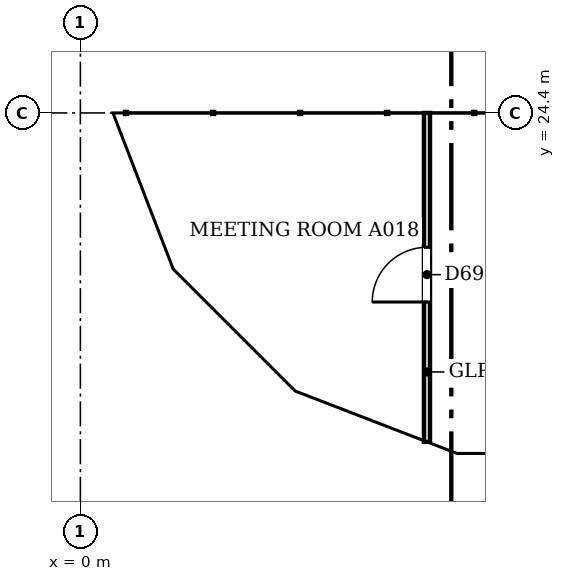
"""IFC4 building model, lengths in metres.
Left out: names, types, materials, properties, quantities, classifications, styles, units other than length and angle.
Written with IfcOpenShell. Run it as: python <this file> out.ifc"""

import sys

from ifc_helpers import new_model, si_unit, direction, frame, frame_2d, origin, place, context, subcontext, project, spatial, polyline, rectangle, outline, extrude, faceted_brep, source, transform, mapped, element, fill, save


model = new_model("IFC4")
c1 = context("Model", 3, precision=1e-05, world=origin(), true_north=direction((0.0, 1.0)))
c2 = subcontext(c1, "Body", "Model", "MODEL_VIEW")
j1 = project(units=[si_unit("LENGTHUNIT", "METRE"), si_unit("PLANEANGLEUNIT", "RADIAN")], contexts=[c1])
p1 = place(None, origin())
s1 = spatial("IfcSite", under=j1, at=p1, CompositionType="ELEMENT")
p2 = place(p1, origin())
s2 = spatial("IfcBuilding", under=s1, at=p2, CompositionType="ELEMENT")
p3 = place(p2, frame((0.0, 0.0, 220.7)))
s3 = spatial("IfcBuildingStorey", under=s2, at=p3, CompositionType="ELEMENT", Elevation=220.7)
m1 = source(origin(), c2, "Body", "Brep", [
    faceted_brep([(3.05, -0.25, 0.0), (6.053, -0.25, 3.8), (3.05, -0.25, 7.6), (0.0, -0.25, 3.8), (0.0, 0.25, 3.8), (3.05, 0.25, 7.6), (6.007, 0.25, 3.859), (6.007, 0.25, 3.741), (3.05, 0.25, 0.0), (6.053, 0.0, 3.8)], [[[0, 1, 2, 3]], [[4, 5, 6, 7, 8]], [[8, 7, 9, 1, 0]], [[6, 5, 2, 1, 9]], [[5, 4, 3, 2]], [[4, 8, 0, 3]], [[9, 7, 6]]]),
])
p4 = place(p3, frame((0.25, 30.5, -3.8), z_axis=(0.0, 0.0, 1.0), x_axis=(0.0, -1.0, 0.0)))
e1 = element("IfcWall", 1, at=p4, inside=s3, PredefinedType="SOLIDWALL", context=c2, shape_type="MappedRepresentation", body=[
    mapped(m1, transform((0.0, 0.0, 0.0), scale=1.0)),
])
m2 = source(origin(), c2, "Body", "SweptSolid", [
    extrude(outline(polyline([(3.049, 0.401), (5.735, 3.8), (3.049, 7.199), (0.321, 3.8), (3.049, 0.401)])), frame((0.0, 0.26, 0.0), z_axis=(0.0, -1.0, 0.0), x_axis=(1.0, 0.0, 0.0)), (0.0, 0.0, 1.0), 0.52),
])
p5 = place(p4, origin())
e2 = element("IfcOpeningElement", 2, at=p5, cuts=e1, PredefinedType="OPENING", context=c2, shape_type="MappedRepresentation", body=[
    mapped(m2, transform((0.0, 0.0, 0.0), scale=1.0)),
])
m3 = source(origin(), c2, "Body", "Brep", [
    faceted_brep([(2.95, -0.25, 0.0), (3.003, -0.25, 0.068), (3.003, -0.25, 7.532), (2.95, -0.25, 7.6), (0.0, -0.25, 3.8), (0.047, 0.25, 3.86), (2.898, 0.25, 7.532), (2.898, 0.25, 0.068), (0.047, 0.25, 3.74), (2.95, 0.0, 0.0), (2.95, 0.0, 7.6), (0.0, 0.0, 3.8)], [[[0, 1, 2, 3, 4]], [[5, 6, 7, 8]], [[1, 0, 9]], [[10, 3, 2]], [[6, 5, 11, 4, 3, 10]], [[8, 7, 9, 0, 4, 11]], [[8, 11, 5]], [[1, 9, 7, 6, 10, 2]]]),
])
p6 = place(p3, frame((0.25, 24.447, -3.8), z_axis=(0.0, 0.0, 1.0), x_axis=(0.35992665181, -0.932980602862, 0.0)))
e3 = element("IfcWall", 3, at=p6, inside=s3, PredefinedType="SOLIDWALL", context=c2, shape_type="MappedRepresentation", body=[
    mapped(m3, transform((0.0, 0.0, 0.0), scale=1.0)),
])
m4 = source(origin(), c2, "Body", "SweptSolid", [
    extrude(outline(polyline([(2.75, 6.935), (0.316, 3.8), (2.75, 0.665), (2.75, 6.935)])), frame((0.0, 0.26, 0.0), z_axis=(0.0, -1.0, 0.0), x_axis=(1.0, 0.0, 0.0)), (0.0, 0.0, 1.0), 0.52),
])
p7 = place(p6, origin())
e4 = element("IfcOpeningElement", 4, at=p7, cuts=e3, PredefinedType="OPENING", context=c2, shape_type="MappedRepresentation", body=[
    mapped(m4, transform((0.0, 0.0, 0.0), scale=1.0)),
])
m5 = source(origin(), c2, "Body", "Brep", [
    faceted_brep([(0.053, -0.25, 0.0), (2.997, -0.25, 3.8), (0.053, -0.25, 7.6), (0.0, -0.25, 7.532), (0.0, -0.25, 0.068), (0.106, 0.25, 7.532), (2.944, 0.25, 3.868), (2.944, 0.25, 3.732), (0.106, 0.25, 0.068), (2.997, 0.0, 3.8), (0.053, 0.0, 0.0), (0.053, 0.0, 7.6)], [[[0, 1, 2, 3, 4]], [[5, 6, 7, 8]], [[8, 7, 9, 1, 0, 10]], [[6, 5, 11, 2, 1, 9]], [[3, 2, 11]], [[10, 0, 4]], [[8, 10, 4, 3, 11, 5]], [[9, 7, 6]]]),
])
p8 = place(p3, frame((1.274, 21.731, -3.8), z_axis=(0.0, 0.0, 1.0), x_axis=(0.707147509625, -0.707066050402, 0.0)))
e5 = element("IfcWall", 5, at=p8, inside=s3, PredefinedType="SOLIDWALL", context=c2, shape_type="MappedRepresentation", body=[
    mapped(m5, transform((0.0, 0.0, 0.0), scale=1.0)),
])
m6 = source(origin(), c2, "Body", "SweptSolid", [
    extrude(outline(polyline([(0.253, 0.667), (2.681, 3.8), (0.253, 6.934), (0.253, 0.667)])), frame((0.0, 0.26, 0.0), z_axis=(0.0, -1.0, 0.0), x_axis=(1.0, 0.0, 0.0)), (0.0, 0.0, 1.0), 0.52),
])
p9 = place(p8, origin())
e6 = element("IfcOpeningElement", 6, at=p9, cuts=e5, PredefinedType="OPENING", context=c2, shape_type="MappedRepresentation", body=[
    mapped(m6, transform((0.0, 0.0, 0.0), scale=1.0)),
])
m7 = source(origin(), c2, "Body", "Brep", [
    faceted_brep([(2.95, -0.25, 0.0), (2.997, -0.25, 0.059), (2.997, -0.25, 7.541), (2.95, -0.25, 7.6), (0.0, -0.25, 3.8), (0.053, 0.25, 3.868), (2.904, 0.25, 7.54), (2.904, 0.25, 0.06), (0.053, 0.25, 3.732), (2.95, 0.0, 0.0), (2.95, 0.0, 7.6), (0.0, 0.0, 3.8)], [[[0, 1, 2, 3, 4]], [[5, 6, 7, 8]], [[1, 0, 9]], [[10, 3, 2]], [[6, 5, 11, 4, 3, 10]], [[8, 7, 9, 0, 4, 11]], [[8, 11, 5]], [[1, 9, 7, 6, 10, 2]]]),
])
p10 = place(p3, frame((3.394, 19.612, -3.8), z_axis=(0.0, 0.0, 1.0), x_axis=(0.932990326376, -0.359901446078, 0.0)))
e7 = element("IfcWall", 7, at=p10, inside=s3, PredefinedType="SOLIDWALL", context=c2, shape_type="MappedRepresentation", body=[
    mapped(m7, transform((0.0, 0.0, 0.0), scale=1.0)),
])
p11 = place(p10, origin())
e8 = element("IfcOpeningElement", 8, at=p11, cuts=e7, PredefinedType="OPENING", context=c2, shape_type="MappedRepresentation", body=[
    mapped(m4, transform((0.0, 0.0, 0.0), scale=1.0)),
])
m8 = source(origin(), c2, "Body", "Brep", [
    faceted_brep([(0.047, -0.25, 0.0), (3.05, -0.25, 3.8), (0.047, -0.25, 7.6), (0.0, -0.25, 7.54), (0.0, -0.25, 0.06), (0.093, 0.25, 7.541), (3.05, 0.25, 3.8), (0.093, 0.25, 0.059), (0.047, 0.0, 0.0), (0.047, 0.0, 7.6)], [[[0, 1, 2, 3, 4]], [[5, 6, 7]], [[7, 6, 1, 0, 8]], [[6, 5, 9, 2, 1]], [[3, 2, 9]], [[8, 0, 4]], [[7, 8, 4, 3, 9, 5]]]),
])
p12 = place(p3, frame((6.1, 18.55, -3.8), z_axis=(0.0, 0.0, 1.0), x_axis=(1.0, 0.0, 0.0)))
e9 = element("IfcWall", 9, at=p12, inside=s3, PredefinedType="SOLIDWALL", context=c2, shape_type="MappedRepresentation", body=[
    mapped(m8, transform((0.0, 0.0, 0.0), scale=1.0)),
])
m9 = source(origin(), c2, "Body", "SweptSolid", [
    extrude(outline(polyline([(0.247, 0.656), (2.731, 3.8), (0.247, 6.944), (0.247, 0.656)])), frame((0.0, 0.26, 0.0), z_axis=(0.0, -1.0, 0.0), x_axis=(1.0, 0.0, 0.0)), (0.0, 0.0, 1.0), 0.52),
])
p13 = place(p12, origin())
e10 = element("IfcOpeningElement", 10, at=p13, cuts=e9, PredefinedType="OPENING", context=c2, shape_type="MappedRepresentation", body=[
    mapped(m9, transform((0.0, 0.0, 0.0), scale=1.0)),
])
p14 = place(p2, frame((0.0, 0.0, 224.5)))
s4 = spatial("IfcBuildingStorey", under=s2, at=p14, CompositionType="ELEMENT", Elevation=224.5)
m10 = source(origin(), c2, "Body", "Brep", [
    faceted_brep([(3.003, -0.25, 0.0), (3.05, -0.25, 0.06), (3.05, -0.25, 7.54), (3.003, -0.25, 7.6), (0.0, -0.25, 3.8), (0.0, 0.25, 3.8), (2.957, 0.25, 7.541), (2.957, 0.25, 0.059), (3.003, 0.0, 0.0), (3.003, 0.0, 7.6)], [[[0, 1, 2, 3, 4]], [[5, 6, 7]], [[1, 0, 8]], [[9, 3, 2]], [[6, 5, 4, 3, 9]], [[5, 7, 8, 0, 4]], [[1, 8, 7, 6, 9, 2]]]),
])
p15 = place(p14, frame((0.25, 27.45, -3.8), z_axis=(0.0, 0.0, 1.0), x_axis=(0.0, -1.0, 0.0)))
e11 = element("IfcWall", 11, at=p15, inside=s4, PredefinedType="SOLIDWALL", context=c2, shape_type="MappedRepresentation", body=[
    mapped(m10, transform((0.0, 0.0, 0.0), scale=1.0)),
])
m11 = source(origin(), c2, "Body", "SweptSolid", [
    extrude(outline(polyline([(2.803, 6.944), (0.319, 3.8), (2.803, 0.656), (2.803, 6.944)])), frame((0.0, 0.26, 0.0), z_axis=(0.0, -1.0, 0.0), x_axis=(1.0, 0.0, 0.0)), (0.0, 0.0, 1.0), 0.52),
])
p16 = place(p15, origin())
e12 = element("IfcOpeningElement", 12, at=p16, cuts=e11, PredefinedType="OPENING", context=c2, shape_type="MappedRepresentation", body=[
    mapped(m11, transform((0.0, 0.0, 0.0), scale=1.0)),
])
m12 = source(origin(), c2, "Body", "Brep", [
    faceted_brep([(0.047, -0.25, 0.0), (2.997, -0.25, 3.8), (0.047, -0.25, 7.6), (0.0, -0.25, 7.541), (0.0, -0.25, 0.059), (0.093, 0.25, 7.54), (2.944, 0.25, 3.868), (2.944, 0.25, 3.732), (0.093, 0.25, 0.06), (2.997, 0.0, 3.8), (0.047, 0.0, 0.0), (0.047, 0.0, 7.6)], [[[0, 1, 2, 3, 4]], [[5, 6, 7, 8]], [[8, 7, 9, 1, 0, 10]], [[6, 5, 11, 2, 1, 9]], [[3, 2, 11]], [[10, 0, 4]], [[8, 10, 4, 3, 11, 5]], [[9, 7, 6]]]),
])
p17 = place(p14, frame((0.233, 24.49, -3.8), z_axis=(0.0, 0.0, 1.0), x_axis=(0.359901446078, -0.932990326376, 0.0)))
e13 = element("IfcWall", 13, at=p17, inside=s4, PredefinedType="SOLIDWALL", context=c2, shape_type="MappedRepresentation", body=[
    mapped(m12, transform((0.0, 0.0, 0.0), scale=1.0)),
])
m13 = source(origin(), c2, "Body", "SweptSolid", [
    extrude(outline(polyline([(0.247, 0.665), (2.681, 3.8), (0.247, 6.935), (0.247, 0.665)])), frame((0.0, 0.26, 0.0), z_axis=(0.0, -1.0, 0.0), x_axis=(1.0, 0.0, 0.0)), (0.0, 0.0, 1.0), 0.52),
])
p18 = place(p17, origin())
e14 = element("IfcOpeningElement", 14, at=p18, cuts=e13, PredefinedType="OPENING", context=c2, shape_type="MappedRepresentation", body=[
    mapped(m13, transform((0.0, 0.0, 0.0), scale=1.0)),
])
m14 = source(origin(), c2, "Body", "Brep", [
    faceted_brep([(2.944, -0.25, 0.0), (2.997, -0.25, 0.068), (2.997, -0.25, 7.532), (2.944, -0.25, 7.6), (0.0, -0.25, 3.8), (0.053, 0.25, 3.868), (2.891, 0.25, 7.532), (2.891, 0.25, 0.068), (0.053, 0.25, 3.732), (2.944, 0.0, 0.0), (2.944, 0.0, 7.6), (0.0, 0.0, 3.8)], [[[0, 1, 2, 3, 4]], [[5, 6, 7, 8]], [[1, 0, 9]], [[10, 3, 2]], [[6, 5, 11, 4, 3, 10]], [[8, 7, 9, 0, 4, 11]], [[8, 11, 5]], [[1, 9, 7, 6, 10, 2]]]),
])
p19 = place(p14, frame((1.312, 21.694, -3.8), z_axis=(0.0, 0.0, 1.0), x_axis=(0.707066050402, -0.707147509625, 0.0)))
e15 = element("IfcWall", 15, at=p19, inside=s4, PredefinedType="SOLIDWALL", context=c2, shape_type="MappedRepresentation", body=[
    mapped(m14, transform((0.0, 0.0, 0.0), scale=1.0)),
])
m15 = source(origin(), c2, "Body", "SweptSolid", [
    extrude(outline(polyline([(2.744, 6.934), (0.316, 3.8), (2.744, 0.666), (2.744, 6.934)])), frame((0.0, 0.26, 0.0), z_axis=(0.0, -1.0, 0.0), x_axis=(1.0, 0.0, 0.0)), (0.0, 0.0, 1.0), 0.52),
])
p20 = place(p19, origin())
e16 = element("IfcOpeningElement", 16, at=p20, cuts=e15, PredefinedType="OPENING", context=c2, shape_type="MappedRepresentation", body=[
    mapped(m15, transform((0.0, 0.0, 0.0), scale=1.0)),
])
m16 = source(origin(), c2, "Body", "Brep", [
    faceted_brep([(0.053, -0.25, 0.0), (3.003, -0.25, 3.8), (0.053, -0.25, 7.6), (0.0, -0.25, 7.532), (0.0, -0.25, 0.068), (0.106, 0.25, 7.532), (2.957, 0.25, 3.86), (2.957, 0.25, 3.74), (0.106, 0.25, 0.068), (3.003, 0.0, 3.8), (0.053, 0.0, 0.0), (0.053, 0.0, 7.6)], [[[0, 1, 2, 3, 4]], [[5, 6, 7, 8]], [[8, 7, 9, 1, 0, 10]], [[6, 5, 11, 2, 1, 9]], [[3, 2, 11]], [[10, 0, 4]], [[8, 10, 4, 3, 11, 5]], [[9, 7, 6]]]),
])
p21 = place(p14, frame((3.344, 19.631, -3.8), z_axis=(0.0, 0.0, 1.0), x_axis=(0.933007896601, -0.359855894603, 0.0)))
e17 = element("IfcWall", 17, at=p21, inside=s4, PredefinedType="SOLIDWALL", context=c2, shape_type="MappedRepresentation", body=[
    mapped(m16, transform((0.0, 0.0, 0.0), scale=1.0)),
])
m17 = source(origin(), c2, "Body", "SweptSolid", [
    extrude(outline(polyline([(0.253, 0.665), (2.687, 3.8), (0.253, 6.935), (0.253, 0.665)])), frame((0.0, 0.26, 0.0), z_axis=(0.0, -1.0, 0.0), x_axis=(1.0, 0.0, 0.0)), (0.0, 0.0, 1.0), 0.52),
])
p22 = place(p21, origin())
e18 = element("IfcOpeningElement", 18, at=p22, cuts=e17, PredefinedType="OPENING", context=c2, shape_type="MappedRepresentation", body=[
    mapped(m17, transform((0.0, 0.0, 0.0), scale=1.0)),
])
m18 = source(origin(), c2, "Body", "Brep", [
    faceted_brep([(3.003, -0.25, 0.0), (6.053, -0.25, 3.8), (3.003, -0.25, 7.6), (0.0, -0.25, 3.8), (0.047, 0.25, 3.859), (3.003, 0.25, 7.6), (6.053, 0.25, 3.8), (3.003, 0.25, 0.0), (0.047, 0.25, 3.741), (0.0, 0.0, 3.8)], [[[0, 1, 2, 3]], [[4, 5, 6, 7, 8]], [[7, 6, 1, 0]], [[6, 5, 2, 1]], [[5, 4, 9, 3, 2]], [[8, 7, 0, 3, 9]], [[8, 9, 4]]]),
])
p23 = place(p14, frame((6.146, 18.55, -3.8), z_axis=(0.0, 0.0, 1.0), x_axis=(1.0, 0.0, 0.0)))
e19 = element("IfcWall", 19, at=p23, inside=s4, PredefinedType="SOLIDWALL", context=c2, shape_type="MappedRepresentation", body=[
    mapped(m18, transform((0.0, 0.0, 0.0), scale=1.0)),
])
m19 = source(origin(), c2, "Body", "SweptSolid", [
    extrude(outline(polyline([(3.005, 0.401), (5.733, 3.8), (3.005, 7.199), (0.319, 3.8), (3.005, 0.401)])), frame((0.0, 0.26, 0.0), z_axis=(0.0, -1.0, 0.0), x_axis=(1.0, 0.0, 0.0)), (0.0, 0.0, 1.0), 0.52),
])
p24 = place(p23, origin())
e20 = element("IfcOpeningElement", 20, at=p24, cuts=e19, PredefinedType="OPENING", context=c2, shape_type="MappedRepresentation", body=[
    mapped(m19, transform((0.0, 0.0, 0.0), scale=1.0)),
])
p25 = place(p3, frame((5.7, 18.99, 0.0), z_axis=(0.0, 0.0, 1.0), x_axis=(0.0, 1.0, 0.0)))
e21 = element("IfcWall", 21, at=p25, inside=s3, PredefinedType="PARTITIONING", context=c2, shape_type="SweptSolid", body=[
    extrude(rectangle(XDim=5.41, YDim=0.1, at=frame_2d((2.705, 0.0))), origin(), (0.0, 0.0, 1.0), 3.067),
])
m20 = source(origin(), c2, "Body", "SweptSolid", [
    extrude(rectangle(XDim=0.9, YDim=2.1, at=frame_2d((0.45, 1.05))), frame((0.0, 0.06, 0.0), z_axis=(0.0, -1.0, 0.0), x_axis=(1.0, 0.0, 0.0)), (0.0, 0.0, 1.0), 0.12),
])
p26 = place(p25, frame((2.3, 0.0, 0.0)))
e22 = element("IfcOpeningElement", 22, at=p26, cuts=e21, PredefinedType="OPENING", context=c2, shape_type="MappedRepresentation", body=[
    mapped(m20, transform((0.0, 0.0, 0.0), scale=1.0)),
])
m21 = source(origin(), c2, "Body", "SweptSolid", [
    extrude(rectangle(XDim=0.9, YDim=2.1, at=frame_2d((0.45, 1.05))), frame((0.0, 0.025, 0.0), z_axis=(0.0, -1.0, 0.0), x_axis=(1.0, 0.0, 0.0)), (0.0, 0.0, 1.0), 0.05),
])
p27 = place(p26, origin())
e23 = element("IfcDoor", 23, at=p27, inside=s3, OperationType="SINGLE_SWING_LEFT", PredefinedType="DOOR", context=c2, shape_type="MappedRepresentation", body=[
    mapped(m21, transform((0.0, 0.0, 0.0), scale=1.0)),
])
fill(e22, e23)
save(model, sys.argv[1])
